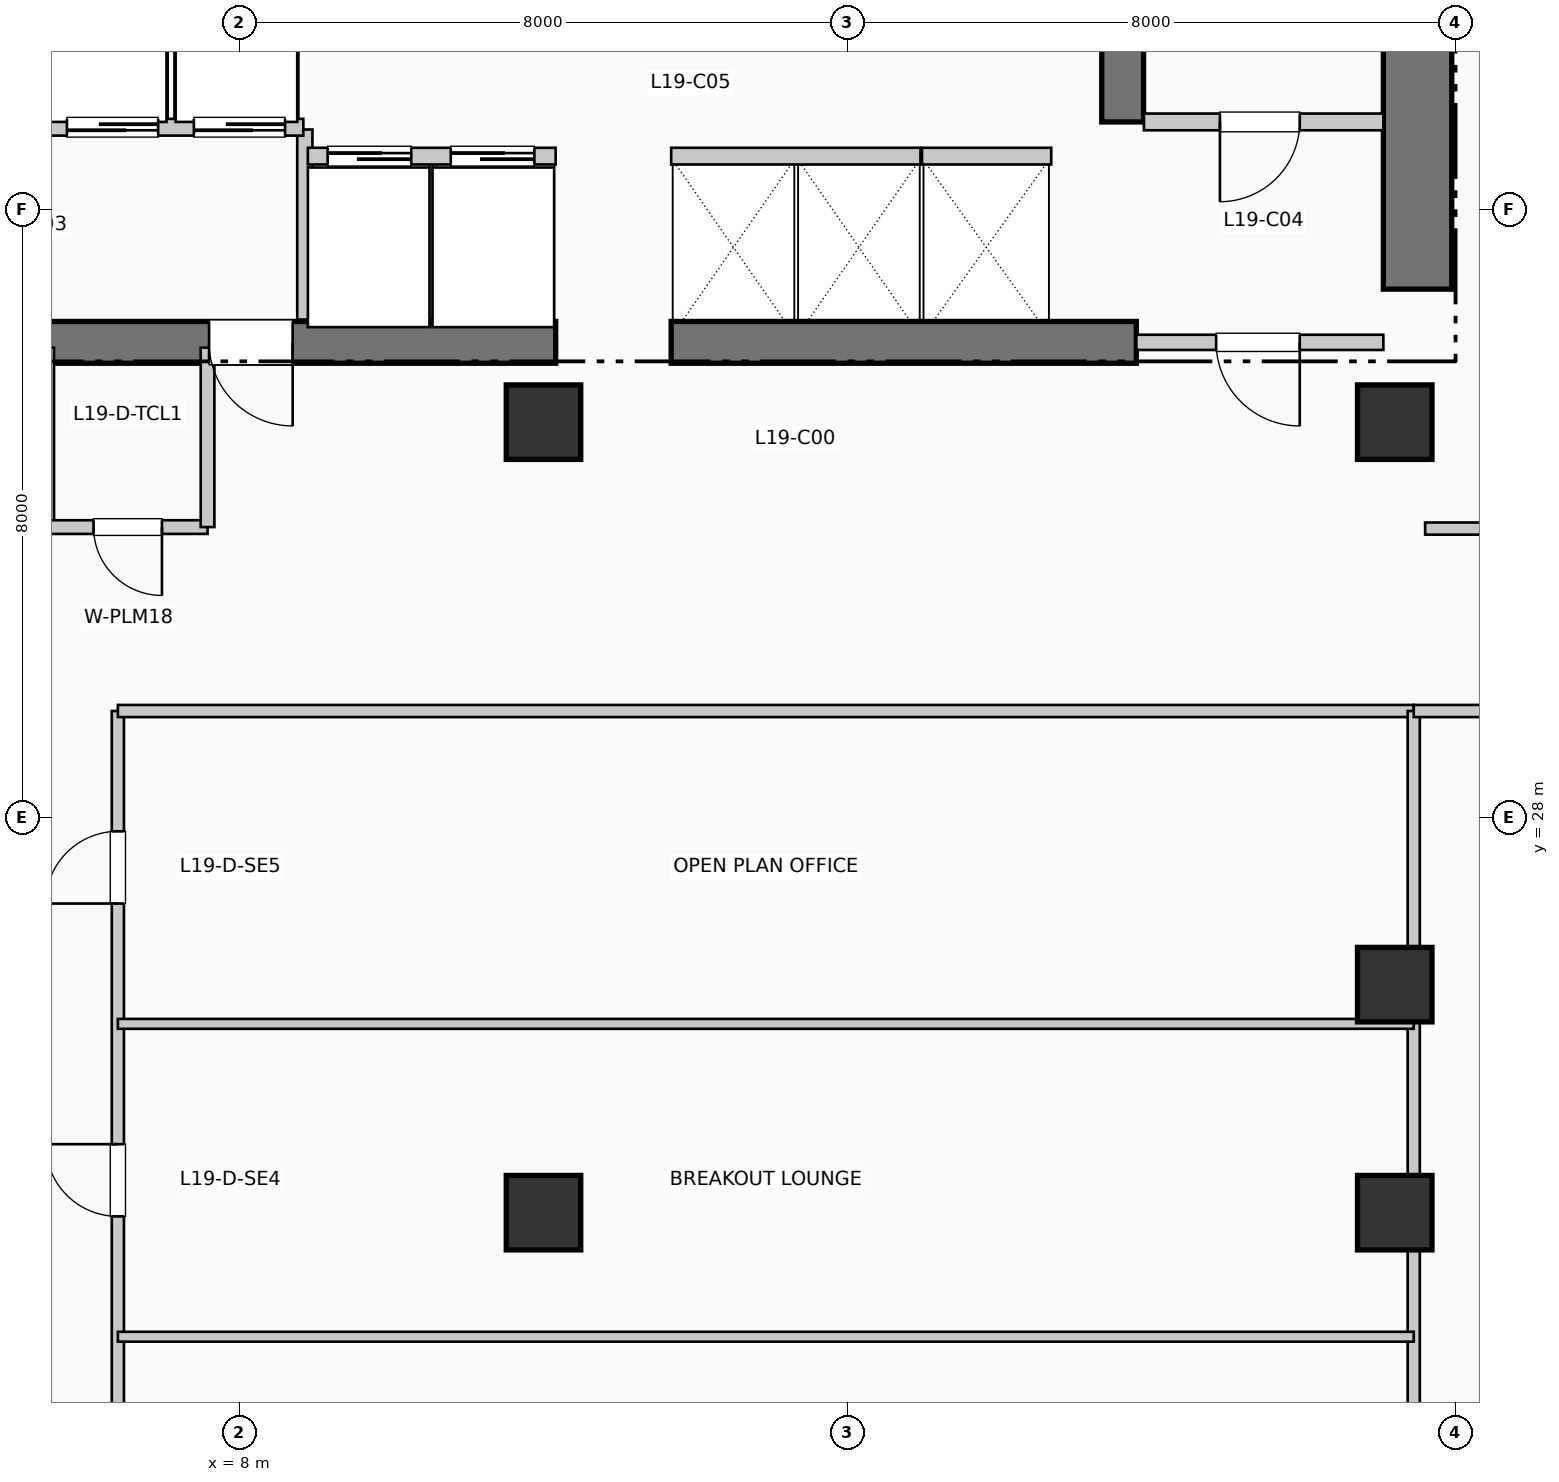
"""IFC4 building model, lengths in metres.
Left out: names, types, materials, properties, quantities, classifications, styles, units other than length and angle.
Written with IfcOpenShell. Run it as: python <this file> out.ifc"""

import sys

from ifc_helpers import new_model, si_unit, direction, frame, frame_2d, origin, origin_2d, place, context, subcontext, project, spatial, rectangle, extrude, element, fill, save


model = new_model("IFC4")
c1 = context("Model", 3, precision=1e-05, world=origin(), true_north=direction((0.0, 1.0)))
c2 = subcontext(c1, "Body", "Model", "MODEL_VIEW")
j1 = project(units=[si_unit("LENGTHUNIT", "METRE"), si_unit("PLANEANGLEUNIT", "RADIAN")], contexts=[c1])
p1 = place(None, origin())
s1 = spatial("IfcSite", under=j1, at=p1, CompositionType="ELEMENT")
p2 = place(p1, origin())
s2 = spatial("IfcBuilding", under=s1, at=p2, CompositionType="ELEMENT")
p3 = place(p2, frame((0.0, 0.0, 81.84)))
s3 = spatial("IfcBuildingStorey", under=s2, at=p3, CompositionType="ELEMENT", Elevation=81.84)
p4 = place(p3, frame((23.5, 34.95, 0.0), z_axis=(0.0, 0.0, 1.0), x_axis=(0.0, 1.0, 0.0)))
e1 = element("IfcWall", 1, at=p4, inside=s3, PredefinedType="SHEAR", context=c2, shape_type="SweptSolid", body=[
    extrude(rectangle(XDim=10.64, YDim=0.9, at=frame_2d((5.32, 0.0))), origin(), (0.0, 0.0, 1.0), 3.96),
])
p5 = place(p3, frame((1.45, 34.25, 0.0), z_axis=(0.0, 0.0, 1.0), x_axis=(1.0, 0.0, 0.0)))
e2 = element("IfcWall", 2, at=p5, inside=s3, PredefinedType="SHEAR", context=c2, shape_type="SweptSolid", body=[
    extrude(rectangle(XDim=10.71, YDim=0.55, at=frame_2d((5.355, 0.0))), origin(), (0.0, 0.0, 1.0), 3.96),
])
p6 = place(p5, frame((7.25, 0.0, 0.0), z_axis=(0.0, 0.0, 1.0), x_axis=(-1.0, 0.0, 0.0)))
e3 = element("IfcOpeningElement", 3, at=p6, cuts=e2, PredefinedType="OPENING", context=c2, shape_type="SweptSolid", body=[
    extrude(rectangle(XDim=1.1, YDim=2.15, at=frame_2d((0.55, 1.075))), frame((0.0, 0.285, 0.0), z_axis=(0.0, -1.0, 0.0), x_axis=(1.0, 0.0, 0.0)), (0.0, 0.0, 1.0), 0.57),
])
p7 = place(p3, frame((13.68, 34.25, 0.0), z_axis=(0.0, 0.0, 1.0), x_axis=(1.0, 0.0, 0.0)))
e4 = element("IfcWall", 4, at=p7, inside=s3, PredefinedType="SHEAR", context=c2, shape_type="SweptSolid", body=[
    extrude(rectangle(XDim=6.12, YDim=0.55, at=frame_2d((3.06, 0.0))), origin(), (0.0, 0.0, 1.0), 3.96),
])
p8 = place(p3, frame((19.62, 37.15, 0.0), z_axis=(0.0, 0.0, 1.0), x_axis=(0.0, 1.0, 0.0)))
e5 = element("IfcWall", 5, at=p8, inside=s3, PredefinedType="SHEAR", context=c2, shape_type="SweptSolid", body=[
    extrude(rectangle(XDim=7.89, YDim=0.55, at=frame_2d((3.945, 0.0))), origin(), (0.0, 0.0, 1.0), 3.96),
])
for number, where, z_axis, x_axis in (
    (6, (12.0, 22.8, 0.0), (0.0, 0.0, 1.0), (1.0, 0.0, 0.0)),
    (7, (12.0, 33.2, 0.0), (0.0, 0.0, 1.0), (1.0, 0.0, 0.0)),
    (8, (23.2, 22.8, 0.0), (0.0, 0.0, 1.0), (1.0, 0.0, 0.0)),
    (9, (23.2, 25.8, 0.0), (0.0, 0.0, 1.0), (1.0, 0.0, 0.0)),
    (10, (23.2, 33.2, 0.0), (0.0, 0.0, 1.0), (1.0, 0.0, 0.0)),
):
    element("IfcColumn", number, at=place(p3, frame(where, z_axis=z_axis, x_axis=x_axis)), inside=s3, PredefinedType="COLUMN", context=c2, shape_type="SweptSolid", body=[
        extrude(rectangle(XDim=0.98, YDim=0.98, at=origin_2d()), origin(), (0.0, 0.0, 1.0), 3.96),
    ])
p9 = place(p3, frame((8.86, 34.55, 0.0), z_axis=(0.0, 0.0, 1.0), x_axis=(0.0, 1.0, 0.0)))
e11 = element("IfcWall", 11, at=p9, inside=s3, PredefinedType="PARTITIONING", context=c2, shape_type="SweptSolid", body=[
    extrude(rectangle(XDim=2.5, YDim=0.2, at=frame_2d((1.25, 0.0))), origin(), (0.0, 0.0, 1.0), 3.71),
])
p10 = place(p3, frame((19.9, 37.15, 0.0), z_axis=(0.0, 0.0, 1.0), x_axis=(1.0, 0.0, 0.0)))
e12 = element("IfcWall", 12, at=p10, inside=s3, PredefinedType="PARTITIONING", context=c2, shape_type="SweptSolid", body=[
    extrude(rectangle(XDim=3.15, YDim=0.22, at=frame_2d((1.575, 0.0))), origin(), (0.0, 0.0, 1.0), 3.71),
])
p11 = place(p10, frame((2.05, 0.0, 0.0), z_axis=(0.0, 0.0, 1.0), x_axis=(-1.0, 0.0, 0.0)))
e13 = element("IfcOpeningElement", 13, at=p11, cuts=e12, PredefinedType="OPENING", context=c2, shape_type="SweptSolid", body=[
    extrude(rectangle(XDim=1.05, YDim=2.15, at=frame_2d((0.525, 1.075))), frame((0.0, 0.12, 0.0), z_axis=(0.0, -1.0, 0.0), x_axis=(1.0, 0.0, 0.0)), (0.0, 0.0, 1.0), 0.24),
])
p12 = place(p3, frame((19.8, 34.25, 0.0), z_axis=(0.0, 0.0, 1.0), x_axis=(1.0, 0.0, 0.0)))
e14 = element("IfcWall", 14, at=p12, inside=s3, PredefinedType="PARTITIONING", context=c2, shape_type="SweptSolid", body=[
    extrude(rectangle(XDim=3.25, YDim=0.2, at=frame_2d((1.625, 0.0))), origin(), (0.0, 0.0, 1.0), 3.71),
])
p13 = place(p12, frame((2.15, 0.0, 0.0), z_axis=(0.0, 0.0, 1.0), x_axis=(-1.0, 0.0, 0.0)))
e15 = element("IfcOpeningElement", 15, at=p13, cuts=e14, PredefinedType="OPENING", context=c2, shape_type="SweptSolid", body=[
    extrude(rectangle(XDim=1.1, YDim=2.15, at=frame_2d((0.55, 1.075))), frame((0.0, 0.11, 0.0), z_axis=(0.0, -1.0, 0.0), x_axis=(1.0, 0.0, 0.0)), (0.0, 0.0, 1.0), 0.22),
])
p14 = place(p3, frame((5.38, 37.08, 0.0), z_axis=(0.0, 0.0, 1.0), x_axis=(1.0, 0.0, 0.0)))
e16 = element("IfcWall", 16, at=p14, inside=s3, PredefinedType="PARTITIONING", context=c2, shape_type="SweptSolid", body=[
    extrude(rectangle(XDim=3.46, YDim=0.22, at=frame_2d((1.73, 0.0))), origin(), (0.0, 0.0, 1.0), 3.71),
])
p15 = place(p14, frame((1.55, 0.0, 0.0), z_axis=(0.0, 0.0, 1.0), x_axis=(-1.0, 0.0, 0.0)))
e17 = element("IfcOpeningElement", 17, at=p15, cuts=e16, PredefinedType="OPENING", context=c2, shape_type="SweptSolid", body=[
    extrude(rectangle(XDim=1.2, YDim=2.2, at=frame_2d((0.6, 1.1))), frame((0.0, 0.12, 0.0), z_axis=(0.0, -1.0, 0.0), x_axis=(1.0, 0.0, 0.0)), (0.0, 0.0, 1.0), 0.24),
])
p16 = place(p14, frame((3.22, 0.0, 0.0), z_axis=(0.0, 0.0, 1.0), x_axis=(-1.0, 0.0, 0.0)))
e18 = element("IfcOpeningElement", 18, at=p16, cuts=e16, PredefinedType="OPENING", context=c2, shape_type="SweptSolid", body=[
    extrude(rectangle(XDim=1.2, YDim=2.2, at=frame_2d((0.6, 1.1))), frame((0.0, 0.12, 0.0), z_axis=(0.0, -1.0, 0.0), x_axis=(1.0, 0.0, 0.0)), (0.0, 0.0, 1.0), 0.24),
])
p17 = place(p3, frame((5.45, 31.8, 0.0), z_axis=(0.0, 0.0, 1.0), x_axis=(0.0, 1.0, 0.0)))
e19 = element("IfcWall", 19, at=p17, inside=s3, PredefinedType="PARTITIONING", context=c2, shape_type="SweptSolid", body=[
    extrude(rectangle(XDim=2.38, YDim=0.22, at=frame_2d((1.19, 0.0))), origin(), (0.0, 0.0, 1.0), 3.71),
])
p18 = place(p3, frame((5.5, 31.82, 0.0), z_axis=(0.0, 0.0, 1.0), x_axis=(1.0, 0.0, 0.0)))
e20 = element("IfcWall", 20, at=p18, inside=s3, PredefinedType="PLUMBINGWALL", context=c2, shape_type="SweptSolid", body=[
    extrude(rectangle(XDim=2.08, YDim=0.18, at=frame_2d((1.04, 0.0))), origin(), (0.0, 0.0, 1.0), 3.71),
])
p19 = place(p18, frame((1.48, 0.0, 0.0), z_axis=(0.0, 0.0, 1.0), x_axis=(-1.0, 0.0, 0.0)))
e21 = element("IfcOpeningElement", 21, at=p19, cuts=e20, PredefinedType="OPENING", context=c2, shape_type="SweptSolid", body=[
    extrude(rectangle(XDim=0.9, YDim=2.1, at=frame_2d((0.45, 1.05))), frame((0.0, 0.1, 0.0), z_axis=(0.0, -1.0, 0.0), x_axis=(1.0, 0.0, 0.0)), (0.0, 0.0, 1.0), 0.2),
])
p20 = place(p3, frame((7.58, 31.82, 0.0), z_axis=(0.0, 0.0, 1.0), x_axis=(0.0, 1.0, 0.0)))
e22 = element("IfcWall", 22, at=p20, inside=s3, PredefinedType="PLUMBINGWALL", context=c2, shape_type="SweptSolid", body=[
    extrude(rectangle(XDim=2.36, YDim=0.18, at=frame_2d((1.18, 0.0))), origin(), (0.0, 0.0, 1.0), 3.71),
])
p21 = place(p3, frame((8.9, 36.7, 0.0), z_axis=(0.0, 0.0, 1.0), x_axis=(1.0, 0.0, 0.0)))
e23 = element("IfcWall", 23, at=p21, inside=s3, PredefinedType="PARTITIONING", context=c2, shape_type="SweptSolid", body=[
    extrude(rectangle(XDim=3.26, YDim=0.22, at=frame_2d((1.63, 0.0))), origin(), (0.0, 0.0, 1.0), 3.71),
])
p22 = place(p21, frame((0.26, 0.0, 0.0)))
e24 = element("IfcOpeningElement", 24, at=p22, cuts=e23, PredefinedType="OPENING", context=c2, shape_type="SweptSolid", body=[
    extrude(rectangle(XDim=1.1, YDim=2.2, at=frame_2d((0.55, 1.1))), frame((0.0, 0.12, 0.0), z_axis=(0.0, -1.0, 0.0), x_axis=(1.0, 0.0, 0.0)), (0.0, 0.0, 1.0), 0.24),
])
p23 = place(p21, frame((1.88, 0.0, 0.0)))
e25 = element("IfcOpeningElement", 25, at=p23, cuts=e23, PredefinedType="OPENING", context=c2, shape_type="SweptSolid", body=[
    extrude(rectangle(XDim=1.1, YDim=2.2, at=frame_2d((0.55, 1.1))), frame((0.0, 0.12, 0.0), z_axis=(0.0, -1.0, 0.0), x_axis=(1.0, 0.0, 0.0)), (0.0, 0.0, 1.0), 0.24),
])
p24 = place(p3, frame((13.68, 36.7, 0.0), z_axis=(0.0, 0.0, 1.0), x_axis=(1.0, 0.0, 0.0)))
e26 = element("IfcWall", 26, at=p24, inside=s3, PredefinedType="PARTITIONING", context=c2, shape_type="SweptSolid", body=[
    extrude(rectangle(XDim=3.28, YDim=0.22, at=frame_2d((1.64, 0.0))), origin(), (0.0, 0.0, 1.0), 3.71),
])
p25 = place(p3, frame((16.98, 36.7, 0.0), z_axis=(0.0, 0.0, 1.0), x_axis=(1.0, 0.0, 0.0)))
e27 = element("IfcWall", 27, at=p25, inside=s3, PredefinedType="PARTITIONING", context=c2, shape_type="SweptSolid", body=[
    extrude(rectangle(XDim=1.7, YDim=0.22, at=frame_2d((0.85, 0.0))), origin(), (0.0, 0.0, 1.0), 3.71),
])
p26 = place(p3, frame((6.4, 9.8, 0.0), z_axis=(0.0, 0.0, 1.0), x_axis=(0.0, 1.0, 0.0)))
e28 = element("IfcWall", 28, at=p26, inside=s3, PredefinedType="PARTITIONING", context=c2, shape_type="SweptSolid", body=[
    extrude(rectangle(XDim=19.6, YDim=0.16, at=frame_2d((9.8, 0.0))), origin(), (0.0, 0.0, 1.0), 3.71),
])
p27 = place(p26, frame((1.387, 0.0, 0.0)))
e29 = element("IfcOpeningElement", 29, at=p27, cuts=e28, PredefinedType="OPENING", context=c2, shape_type="SweptSolid", body=[
    extrude(rectangle(XDim=0.95, YDim=2.15, at=frame_2d((0.475, 1.075))), frame((0.0, 0.09, 0.0), z_axis=(0.0, -1.0, 0.0), x_axis=(1.0, 0.0, 0.0)), (0.0, 0.0, 1.0), 0.18),
])
p28 = place(p26, frame((5.111, 0.0, 0.0)))
e30 = element("IfcOpeningElement", 30, at=p28, cuts=e28, PredefinedType="OPENING", context=c2, shape_type="SweptSolid", body=[
    extrude(rectangle(XDim=0.95, YDim=2.15, at=frame_2d((0.475, 1.075))), frame((0.0, 0.09, 0.0), z_axis=(0.0, -1.0, 0.0), x_axis=(1.0, 0.0, 0.0)), (0.0, 0.0, 1.0), 0.18),
])
p29 = place(p26, frame((8.933, 0.0, 0.0)))
e31 = element("IfcOpeningElement", 31, at=p29, cuts=e28, PredefinedType="OPENING", context=c2, shape_type="SweptSolid", body=[
    extrude(rectangle(XDim=0.95, YDim=2.15, at=frame_2d((0.475, 1.075))), frame((0.0, 0.09, 0.0), z_axis=(0.0, -1.0, 0.0), x_axis=(1.0, 0.0, 0.0)), (0.0, 0.0, 1.0), 0.18),
])
p30 = place(p26, frame((12.951, 0.0, 0.0)))
e32 = element("IfcOpeningElement", 32, at=p30, cuts=e28, PredefinedType="OPENING", context=c2, shape_type="SweptSolid", body=[
    extrude(rectangle(XDim=0.95, YDim=2.15, at=frame_2d((0.475, 1.075))), frame((0.0, 0.09, 0.0), z_axis=(0.0, -1.0, 0.0), x_axis=(1.0, 0.0, 0.0)), (0.0, 0.0, 1.0), 0.18),
])
p31 = place(p26, frame((17.067, 0.0, 0.0)))
e33 = element("IfcOpeningElement", 33, at=p31, cuts=e28, PredefinedType="OPENING", context=c2, shape_type="SweptSolid", body=[
    extrude(rectangle(XDim=0.95, YDim=2.15, at=frame_2d((0.475, 1.075))), frame((0.0, 0.09, 0.0), z_axis=(0.0, -1.0, 0.0), x_axis=(1.0, 0.0, 0.0)), (0.0, 0.0, 1.0), 0.18),
])
p32 = place(p3, frame((6.4, 29.4, 0.0), z_axis=(0.0, 0.0, 1.0), x_axis=(1.0, 0.0, 0.0)))
e34 = element("IfcWall", 34, at=p32, inside=s3, PredefinedType="PARTITIONING", context=c2, shape_type="SweptSolid", body=[
    extrude(rectangle(XDim=17.05, YDim=0.16, at=frame_2d((8.525, 0.0))), origin(), (0.0, 0.0, 1.0), 3.365),
])
p33 = place(p3, frame((23.45, 0.19, 0.0), z_axis=(0.0, 0.0, 1.0), x_axis=(0.0, 1.0, 0.0)))
e35 = element("IfcWall", 35, at=p33, inside=s3, PredefinedType="PARTITIONING", context=c2, shape_type="SweptSolid", body=[
    extrude(rectangle(XDim=29.21, YDim=0.16, at=frame_2d((14.605, 0.0))), origin(), (0.0, 0.0, 1.0), 2.995),
])
for number, where, z_axis, x_axis in (
    (36, (6.4, 21.168, 0.0), (0.0, 0.0, 1.0), (1.0, 0.0, 0.0)),
    (37, (6.4, 25.284, 0.0), (0.0, 0.0, 1.0), (1.0, 0.0, 0.0)),
):
    element("IfcWall", number, at=place(p3, frame(where, z_axis=z_axis, x_axis=x_axis)), inside=s3, PredefinedType="PARTITIONING", context=c2, shape_type="SweptSolid", body=[
        extrude(rectangle(XDim=17.05, YDim=0.13, at=frame_2d((8.525, 0.0))), origin(), (0.0, 0.0, 1.0), 3.71),
    ])
p34 = place(p3, frame((23.45, 29.4, 0.0), z_axis=(0.0, 0.0, 1.0), x_axis=(1.0, 0.0, 0.0)))
e38 = element("IfcWall", 38, at=p34, inside=s3, PredefinedType="PARTITIONING", context=c2, shape_type="SweptSolid", body=[
    extrude(rectangle(XDim=32.36, YDim=0.16, at=frame_2d((16.18, 0.0))), origin(), (0.0, 0.0, 1.0), 3.365),
])
p35 = place(p34, frame((4.035, 0.0, 0.0), z_axis=(0.0, 0.0, 1.0), x_axis=(-1.0, 0.0, 0.0)))
e39 = element("IfcOpeningElement", 39, at=p35, cuts=e38, PredefinedType="OPENING", context=c2, shape_type="SweptSolid", body=[
    extrude(rectangle(XDim=0.95, YDim=2.15, at=frame_2d((0.475, 1.075))), frame((0.0, 0.09, 0.0), z_axis=(0.0, -1.0, 0.0), x_axis=(1.0, 0.0, 0.0)), (0.0, 0.0, 1.0), 0.18),
])
p36 = place(p34, frame((11.477, 0.0, 0.0), z_axis=(0.0, 0.0, 1.0), x_axis=(-1.0, 0.0, 0.0)))
e40 = element("IfcOpeningElement", 40, at=p36, cuts=e38, PredefinedType="OPENING", context=c2, shape_type="SweptSolid", body=[
    extrude(rectangle(XDim=0.95, YDim=2.15, at=frame_2d((0.475, 1.075))), frame((0.0, 0.09, 0.0), z_axis=(0.0, -1.0, 0.0), x_axis=(1.0, 0.0, 0.0)), (0.0, 0.0, 1.0), 0.18),
])
p37 = place(p34, frame((19.567, 0.0, 0.0), z_axis=(0.0, 0.0, 1.0), x_axis=(-1.0, 0.0, 0.0)))
e41 = element("IfcOpeningElement", 41, at=p37, cuts=e38, PredefinedType="OPENING", context=c2, shape_type="SweptSolid", body=[
    extrude(rectangle(XDim=0.95, YDim=2.15, at=frame_2d((0.475, 1.075))), frame((0.0, 0.09, 0.0), z_axis=(0.0, -1.0, 0.0), x_axis=(1.0, 0.0, 0.0)), (0.0, 0.0, 1.0), 0.18),
])
p38 = place(p34, frame((28.304, 0.0, 0.0), z_axis=(0.0, 0.0, 1.0), x_axis=(-1.0, 0.0, 0.0)))
e42 = element("IfcOpeningElement", 42, at=p38, cuts=e38, PredefinedType="OPENING", context=c2, shape_type="SweptSolid", body=[
    extrude(rectangle(XDim=0.95, YDim=2.15, at=frame_2d((0.475, 1.075))), frame((0.0, 0.09, 0.0), z_axis=(0.0, -1.0, 0.0), x_axis=(1.0, 0.0, 0.0)), (0.0, 0.0, 1.0), 0.18),
])
p39 = place(p3, frame((23.6, 31.8, 0.0), z_axis=(0.0, 0.0, 1.0), x_axis=(1.0, 0.0, 0.0)))
e43 = element("IfcWall", 43, at=p39, inside=s3, PredefinedType="PARTITIONING", context=c2, shape_type="SweptSolid", body=[
    extrude(rectangle(XDim=32.21, YDim=0.16, at=frame_2d((16.105, 0.0))), origin(), (0.0, 0.0, 1.0), 3.71),
])
p40 = place(p39, frame((14.63, 0.0, 0.0)))
e44 = element("IfcOpeningElement", 44, at=p40, cuts=e43, PredefinedType="OPENING", context=c2, shape_type="SweptSolid", body=[
    extrude(rectangle(XDim=0.95, YDim=2.15, at=frame_2d((0.475, 1.075))), frame((0.0, 0.09, 0.0), z_axis=(0.0, -1.0, 0.0), x_axis=(1.0, 0.0, 0.0)), (0.0, 0.0, 1.0), 0.18),
])
p41 = place(p6, origin())
e45 = element("IfcDoor", 45, at=p41, inside=s3, OperationType="SINGLE_SWING_RIGHT", PredefinedType="DOOR", context=c2, shape_type="SweptSolid", body=[
    extrude(rectangle(XDim=1.1, YDim=2.15, at=frame_2d((0.55, 1.075))), frame((0.0, 0.025, 0.0), z_axis=(0.0, -1.0, 0.0), x_axis=(1.0, 0.0, 0.0)), (0.0, 0.0, 1.0), 0.05),
])
fill(e3, e45)
p42 = place(p11, origin())
e46 = element("IfcDoor", 46, at=p42, inside=s3, OperationType="SINGLE_SWING_LEFT", PredefinedType="DOOR", context=c2, shape_type="SweptSolid", body=[
    extrude(rectangle(XDim=1.05, YDim=2.15, at=frame_2d((0.525, 1.075))), frame((0.0, 0.025, 0.0), z_axis=(0.0, -1.0, 0.0), x_axis=(1.0, 0.0, 0.0)), (0.0, 0.0, 1.0), 0.05),
])
fill(e13, e46)
p43 = place(p13, origin())
e47 = element("IfcDoor", 47, at=p43, inside=s3, OperationType="SINGLE_SWING_RIGHT", PredefinedType="DOOR", context=c2, shape_type="SweptSolid", body=[
    extrude(rectangle(XDim=1.1, YDim=2.15, at=frame_2d((0.55, 1.075))), frame((0.0, 0.025, 0.0), z_axis=(0.0, -1.0, 0.0), x_axis=(1.0, 0.0, 0.0)), (0.0, 0.0, 1.0), 0.05),
])
fill(e15, e47)
p44 = place(p15, origin())
e48 = element("IfcDoor", 48, at=p44, inside=s3, OperationType="SLIDING_TO_RIGHT", PredefinedType="DOOR", context=c2, shape_type="SweptSolid", body=[
    extrude(rectangle(XDim=1.2, YDim=2.2, at=frame_2d((0.6, 1.1))), frame((0.0, 0.025, 0.0), z_axis=(0.0, -1.0, 0.0), x_axis=(1.0, 0.0, 0.0)), (0.0, 0.0, 1.0), 0.05),
])
fill(e17, e48)
p45 = place(p16, origin())
e49 = element("IfcDoor", 49, at=p45, inside=s3, OperationType="SLIDING_TO_RIGHT", PredefinedType="DOOR", context=c2, shape_type="SweptSolid", body=[
    extrude(rectangle(XDim=1.2, YDim=2.2, at=frame_2d((0.6, 1.1))), frame((0.0, 0.025, 0.0), z_axis=(0.0, -1.0, 0.0), x_axis=(1.0, 0.0, 0.0)), (0.0, 0.0, 1.0), 0.05),
])
fill(e18, e49)
p46 = place(p19, origin())
e50 = element("IfcDoor", 50, at=p46, inside=s3, OperationType="SINGLE_SWING_RIGHT", PredefinedType="DOOR", context=c2, shape_type="SweptSolid", body=[
    extrude(rectangle(XDim=0.9, YDim=2.1, at=frame_2d((0.45, 1.05))), frame((0.0, 0.025, 0.0), z_axis=(0.0, -1.0, 0.0), x_axis=(1.0, 0.0, 0.0)), (0.0, 0.0, 1.0), 0.05),
])
fill(e21, e50)
p47 = place(p22, origin())
e51 = element("IfcDoor", 51, at=p47, inside=s3, OperationType="SLIDING_TO_LEFT", PredefinedType="DOOR", context=c2, shape_type="SweptSolid", body=[
    extrude(rectangle(XDim=1.1, YDim=2.2, at=frame_2d((0.55, 1.1))), frame((0.0, 0.025, 0.0), z_axis=(0.0, -1.0, 0.0), x_axis=(1.0, 0.0, 0.0)), (0.0, 0.0, 1.0), 0.05),
])
fill(e24, e51)
p48 = place(p23, origin())
e52 = element("IfcDoor", 52, at=p48, inside=s3, OperationType="SLIDING_TO_LEFT", PredefinedType="DOOR", context=c2, shape_type="SweptSolid", body=[
    extrude(rectangle(XDim=1.1, YDim=2.2, at=frame_2d((0.55, 1.1))), frame((0.0, 0.025, 0.0), z_axis=(0.0, -1.0, 0.0), x_axis=(1.0, 0.0, 0.0)), (0.0, 0.0, 1.0), 0.05),
])
fill(e25, e52)
p49 = place(p30, origin())
e53 = element("IfcDoor", 53, at=p49, inside=s3, OperationType="SINGLE_SWING_RIGHT", PredefinedType="DOOR", context=c2, shape_type="SweptSolid", body=[
    extrude(rectangle(XDim=0.95, YDim=2.15, at=frame_2d((0.475, 1.075))), frame((0.0, 0.025, 0.0), z_axis=(0.0, -1.0, 0.0), x_axis=(1.0, 0.0, 0.0)), (0.0, 0.0, 1.0), 0.05),
])
fill(e32, e53)
p50 = place(p31, origin())
e54 = element("IfcDoor", 54, at=p50, inside=s3, OperationType="SINGLE_SWING_LEFT", PredefinedType="DOOR", context=c2, shape_type="SweptSolid", body=[
    extrude(rectangle(XDim=0.95, YDim=2.15, at=frame_2d((0.475, 1.075))), frame((0.0, 0.025, 0.0), z_axis=(0.0, -1.0, 0.0), x_axis=(1.0, 0.0, 0.0)), (0.0, 0.0, 1.0), 0.05),
])
fill(e33, e54)
save(model, sys.argv[1])
